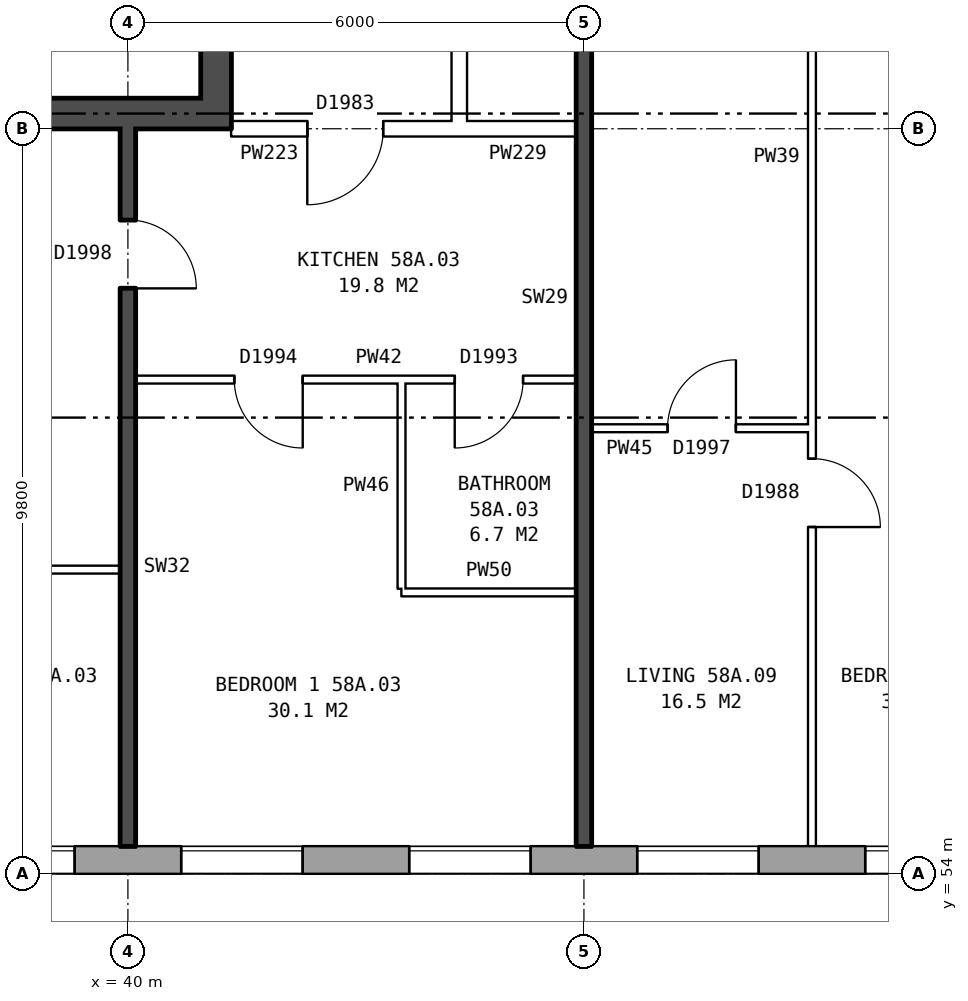
"""IFC4 building model, lengths in metres.
Left out: names, types, materials, properties, quantities, classifications, styles, units other than length and angle.
Written with IfcOpenShell. Run it as: python <this file> out.ifc"""

import sys

from ifc_helpers import new_model, si_unit, direction, frame, frame_2d, origin, place, context, subcontext, project, spatial, rectangle, extrude, element, fill, save


model = new_model("IFC4")
c1 = context("Model", 3, precision=1e-05, world=origin(), true_north=direction((0.0, 1.0)))
c2 = subcontext(c1, "Body", "Model", "MODEL_VIEW")
j1 = project(units=[si_unit("LENGTHUNIT", "METRE"), si_unit("PLANEANGLEUNIT", "RADIAN")], contexts=[c1])
p1 = place(None, origin())
s1 = spatial("IfcSite", under=j1, at=p1, CompositionType="ELEMENT")
p2 = place(p1, origin())
s2 = spatial("IfcBuilding", under=s1, at=p2, CompositionType="ELEMENT")
p3 = place(p2, frame((0.0, 0.0, 205.9)))
s3 = spatial("IfcBuildingStorey", under=s2, at=p3, CompositionType="ELEMENT", Elevation=205.9)
p4 = place(p3, frame((35.075, 54.18, 0.0), z_axis=(0.0, 0.0, 1.0), x_axis=(1.0, 0.0, 0.0)))
e1 = element("IfcWall", 1, at=p4, inside=s3, PredefinedType="STANDARD", context=c2, shape_type="SweptSolid", body=[
    extrude(rectangle(XDim=39.875, YDim=0.36, at=frame_2d((19.938, 0.0))), origin(), (0.0, 0.0, 1.0), 2.85),
])
p5 = place(p4, frame((2.625, 0.0, 0.8)))
e2 = element("IfcOpeningElement", 2, at=p5, cuts=e1, PredefinedType="OPENING", context=c2, shape_type="SweptSolid", body=[
    extrude(rectangle(XDim=1.6, YDim=1.8, at=frame_2d((0.8, 0.9))), frame((0.0, 0.19, 0.0), z_axis=(0.0, -1.0, 0.0), x_axis=(1.0, 0.0, 0.0)), (0.0, 0.0, 1.0), 0.38),
])
p6 = place(p4, frame((5.625, 0.0, 0.8)))
e3 = element("IfcOpeningElement", 3, at=p6, cuts=e1, PredefinedType="OPENING", context=c2, shape_type="SweptSolid", body=[
    extrude(rectangle(XDim=1.6, YDim=1.8, at=frame_2d((0.8, 0.9))), frame((0.0, 0.19, 0.0), z_axis=(0.0, -1.0, 0.0), x_axis=(1.0, 0.0, 0.0)), (0.0, 0.0, 1.0), 0.38),
])
p7 = place(p4, frame((8.625, 0.0, 0.8)))
e4 = element("IfcOpeningElement", 4, at=p7, cuts=e1, PredefinedType="OPENING", context=c2, shape_type="SweptSolid", body=[
    extrude(rectangle(XDim=1.6, YDim=1.8, at=frame_2d((0.8, 0.9))), frame((0.0, 0.19, 0.0), z_axis=(0.0, -1.0, 0.0), x_axis=(1.0, 0.0, 0.0)), (0.0, 0.0, 1.0), 0.38),
])
p8 = place(p4, frame((11.625, 0.0, 0.8)))
e5 = element("IfcOpeningElement", 5, at=p8, cuts=e1, PredefinedType="OPENING", context=c2, shape_type="SweptSolid", body=[
    extrude(rectangle(XDim=1.6, YDim=1.8, at=frame_2d((0.8, 0.9))), frame((0.0, 0.19, 0.0), z_axis=(0.0, -1.0, 0.0), x_axis=(1.0, 0.0, 0.0)), (0.0, 0.0, 1.0), 0.38),
])
p9 = place(p4, frame((14.625, 0.0, 0.8)))
e6 = element("IfcOpeningElement", 6, at=p9, cuts=e1, PredefinedType="OPENING", context=c2, shape_type="SweptSolid", body=[
    extrude(rectangle(XDim=1.6, YDim=1.8, at=frame_2d((0.8, 0.9))), frame((0.0, 0.19, 0.0), z_axis=(0.0, -1.0, 0.0), x_axis=(1.0, 0.0, 0.0)), (0.0, 0.0, 1.0), 0.38),
])
p10 = place(p4, frame((17.625, 0.0, 0.8)))
e7 = element("IfcOpeningElement", 7, at=p10, cuts=e1, PredefinedType="OPENING", context=c2, shape_type="SweptSolid", body=[
    extrude(rectangle(XDim=1.6, YDim=1.8, at=frame_2d((0.8, 0.9))), frame((0.0, 0.19, 0.0), z_axis=(0.0, -1.0, 0.0), x_axis=(1.0, 0.0, 0.0)), (0.0, 0.0, 1.0), 0.38),
])
p11 = place(p4, frame((20.625, 0.0, 0.8)))
e8 = element("IfcOpeningElement", 8, at=p11, cuts=e1, PredefinedType="OPENING", context=c2, shape_type="SweptSolid", body=[
    extrude(rectangle(XDim=1.6, YDim=1.8, at=frame_2d((0.8, 0.9))), frame((0.0, 0.19, 0.0), z_axis=(0.0, -1.0, 0.0), x_axis=(1.0, 0.0, 0.0)), (0.0, 0.0, 1.0), 0.38),
])
p12 = place(p4, frame((23.625, 0.0, 0.8)))
e9 = element("IfcOpeningElement", 9, at=p12, cuts=e1, PredefinedType="OPENING", context=c2, shape_type="SweptSolid", body=[
    extrude(rectangle(XDim=1.6, YDim=1.8, at=frame_2d((0.8, 0.9))), frame((0.0, 0.19, 0.0), z_axis=(0.0, -1.0, 0.0), x_axis=(1.0, 0.0, 0.0)), (0.0, 0.0, 1.0), 0.38),
])
p13 = place(p4, frame((26.625, 0.0, 0.8)))
e10 = element("IfcOpeningElement", 10, at=p13, cuts=e1, PredefinedType="OPENING", context=c2, shape_type="SweptSolid", body=[
    extrude(rectangle(XDim=1.6, YDim=1.8, at=frame_2d((0.8, 0.9))), frame((0.0, 0.19, 0.0), z_axis=(0.0, -1.0, 0.0), x_axis=(1.0, 0.0, 0.0)), (0.0, 0.0, 1.0), 0.38),
])
p14 = place(p4, frame((29.625, 0.0, 0.8)))
e11 = element("IfcOpeningElement", 11, at=p14, cuts=e1, PredefinedType="OPENING", context=c2, shape_type="SweptSolid", body=[
    extrude(rectangle(XDim=1.6, YDim=1.8, at=frame_2d((0.8, 0.9))), frame((0.0, 0.19, 0.0), z_axis=(0.0, -1.0, 0.0), x_axis=(1.0, 0.0, 0.0)), (0.0, 0.0, 1.0), 0.38),
])
p15 = place(p4, frame((32.625, 0.0, 0.8)))
e12 = element("IfcOpeningElement", 12, at=p15, cuts=e1, PredefinedType="OPENING", context=c2, shape_type="SweptSolid", body=[
    extrude(rectangle(XDim=1.6, YDim=1.8, at=frame_2d((0.8, 0.9))), frame((0.0, 0.19, 0.0), z_axis=(0.0, -1.0, 0.0), x_axis=(1.0, 0.0, 0.0)), (0.0, 0.0, 1.0), 0.38),
])
p16 = place(p4, frame((35.125, 0.0, 0.8)))
e13 = element("IfcOpeningElement", 13, at=p16, cuts=e1, PredefinedType="OPENING", context=c2, shape_type="SweptSolid", body=[
    extrude(rectangle(XDim=1.0, YDim=1.8, at=frame_2d((0.5, 0.9))), frame((0.0, 0.19, 0.0), z_axis=(0.0, -1.0, 0.0), x_axis=(1.0, 0.0, 0.0)), (0.0, 0.0, 1.0), 0.38),
])
p17 = place(p4, frame((38.475, 0.0, 0.8)))
e14 = element("IfcOpeningElement", 14, at=p17, cuts=e1, PredefinedType="OPENING", context=c2, shape_type="SweptSolid", body=[
    extrude(rectangle(XDim=1.0, YDim=1.8, at=frame_2d((0.5, 0.9))), frame((0.0, 0.19, 0.0), z_axis=(0.0, -1.0, 0.0), x_axis=(1.0, 0.0, 0.0)), (0.0, 0.0, 1.0), 0.38),
])
p18 = place(p3, frame((41.16, 76.2, 0.0), z_axis=(0.0, 0.0, 1.0), x_axis=(0.0, -1.0, 0.0)))
e15 = element("IfcWall", 15, at=p18, inside=s3, PredefinedType="SHEAR", context=c2, shape_type="SweptSolid", body=[
    extrude(rectangle(XDim=12.4, YDim=0.4, at=frame_2d((6.2, 0.0))), origin(), (0.0, 0.0, 1.0), 2.85),
])
p19 = place(p18, frame((1.325, 0.0, 0.0)))
e16 = element("IfcOpeningElement", 16, at=p19, cuts=e15, PredefinedType="OPENING", context=c2, shape_type="SweptSolid", body=[
    extrude(rectangle(XDim=1.1, YDim=2.1, at=frame_2d((0.55, 1.05))), frame((0.0, 0.21, 0.0), z_axis=(0.0, -1.0, 0.0), x_axis=(1.0, 0.0, 0.0)), (0.0, 0.0, 1.0), 0.42),
])
p20 = place(p18, frame((4.225, 0.0, 0.0)))
e17 = element("IfcOpeningElement", 17, at=p20, cuts=e15, PredefinedType="OPENING", context=c2, shape_type="SweptSolid", body=[
    extrude(rectangle(XDim=0.85, YDim=2.1, at=frame_2d((0.425, 1.05))), frame((0.0, 0.21, 0.0), z_axis=(0.0, -1.0, 0.0), x_axis=(1.0, 0.0, 0.0)), (0.0, 0.0, 1.0), 0.42),
])
p21 = place(p18, frame((7.475, 0.0, 0.0)))
e18 = element("IfcOpeningElement", 18, at=p21, cuts=e15, PredefinedType="OPENING", context=c2, shape_type="SweptSolid", body=[
    extrude(rectangle(XDim=0.85, YDim=2.1, at=frame_2d((0.425, 1.05))), frame((0.0, 0.21, 0.0), z_axis=(0.0, -1.0, 0.0), x_axis=(1.0, 0.0, 0.0)), (0.0, 0.0, 1.0), 0.42),
])
p22 = place(p18, frame((9.9, 0.0, 0.0)))
e19 = element("IfcOpeningElement", 19, at=p22, cuts=e15, PredefinedType="OPENING", context=c2, shape_type="SweptSolid", body=[
    extrude(rectangle(XDim=1.1, YDim=2.1, at=frame_2d((0.55, 1.05))), frame((0.0, 0.21, 0.0), z_axis=(0.0, -1.0, 0.0), x_axis=(1.0, 0.0, 0.0)), (0.0, 0.0, 1.0), 0.42),
])
p23 = place(p3, frame((40.96, 64.0, 0.0), z_axis=(0.0, 0.0, 1.0), x_axis=(-1.0, 0.0, 0.0)))
e20 = element("IfcWall", 20, at=p23, inside=s3, PredefinedType="SHEAR", context=c2, shape_type="SweptSolid", body=[
    extrude(rectangle(XDim=8.2, YDim=0.4, at=frame_2d((4.1, 0.0))), origin(), (0.0, 0.0, 1.0), 2.85),
])
p24 = place(p3, frame((44.36, 63.9, 0.0), z_axis=(0.0, 0.0, 1.0), x_axis=(0.0, 1.0, 0.0)))
e21 = element("IfcWall", 21, at=p24, inside=s3, PredefinedType="PARTITIONING", context=c2, shape_type="SweptSolid", body=[
    extrude(rectangle(XDim=12.2, YDim=0.2, at=frame_2d((6.1, 0.0))), origin(), (0.0, 0.0, 1.0), 2.85),
])
p25 = place(p24, frame((5.1, 0.0, 0.0)))
e22 = element("IfcOpeningElement", 22, at=p25, cuts=e21, PredefinedType="OPENING", context=c2, shape_type="SweptSolid", body=[
    extrude(rectangle(XDim=2.0, YDim=2.1, at=frame_2d((1.0, 1.05))), frame((0.0, 0.11, 0.0), z_axis=(0.0, -1.0, 0.0), x_axis=(1.0, 0.0, 0.0)), (0.0, 0.0, 1.0), 0.22),
])
p26 = place(p3, frame((43.6, 57.7, 0.0), z_axis=(0.0, 0.0, 1.0), x_axis=(1.0, 0.0, 0.0)))
e23 = element("IfcWall", 23, at=p26, inside=s3, PredefinedType="PARTITIONING", context=c2, shape_type="SweptSolid", body=[
    extrude(rectangle(XDim=2.3, YDim=0.1, at=frame_2d((1.15, 0.0))), origin(), (0.0, 0.0, 1.0), 2.85),
])
p27 = place(p3, frame((32.36, 58.0, 0.0), z_axis=(0.0, 0.0, 1.0), x_axis=(1.0, 0.0, 0.0)))
e24 = element("IfcWall", 24, at=p27, inside=s3, PredefinedType="PARTITIONING", context=c2, shape_type="SweptSolid", body=[
    extrude(rectangle(XDim=7.54, YDim=0.1, at=frame_2d((3.77, 0.0))), origin(), (0.0, 0.0, 1.0), 2.85),
])
p28 = place(p27, frame((3.32, 0.0, 0.0)))
e25 = element("IfcOpeningElement", 25, at=p28, cuts=e24, PredefinedType="OPENING", context=c2, shape_type="SweptSolid", body=[
    extrude(rectangle(XDim=0.9, YDim=2.1, at=frame_2d((0.45, 1.05))), frame((0.0, 0.06, 0.0), z_axis=(0.0, -1.0, 0.0), x_axis=(1.0, 0.0, 0.0)), (0.0, 0.0, 1.0), 0.12),
])
p29 = place(p3, frame((46.1, 59.86, 0.0), z_axis=(0.0, 0.0, 1.0), x_axis=(1.0, 0.0, 0.0)))
e26 = element("IfcWall", 26, at=p29, inside=s3, PredefinedType="PARTITIONING", context=c2, shape_type="SweptSolid", body=[
    extrude(rectangle(XDim=2.9, YDim=0.1, at=frame_2d((1.45, 0.0))), origin(), (0.0, 0.0, 1.0), 2.85),
])
p30 = place(p29, frame((1.0, 0.0, 0.0)))
e27 = element("IfcOpeningElement", 27, at=p30, cuts=e26, PredefinedType="OPENING", context=c2, shape_type="SweptSolid", body=[
    extrude(rectangle(XDim=0.9, YDim=2.1, at=frame_2d((0.45, 1.05))), frame((0.0, 0.06, 0.0), z_axis=(0.0, -1.0, 0.0), x_axis=(1.0, 0.0, 0.0)), (0.0, 0.0, 1.0), 0.12),
])
p31 = place(p3, frame((40.1, 60.5, 0.0), z_axis=(0.0, 0.0, 1.0), x_axis=(1.0, 0.0, 0.0)))
e28 = element("IfcWall", 28, at=p31, inside=s3, PredefinedType="PARTITIONING", context=c2, shape_type="SweptSolid", body=[
    extrude(rectangle(XDim=5.8, YDim=0.1, at=frame_2d((2.9, 0.0))), origin(), (0.0, 0.0, 1.0), 2.85),
])
p32 = place(p31, frame((1.3, 0.0, 0.0)))
e29 = element("IfcOpeningElement", 29, at=p32, cuts=e28, PredefinedType="OPENING", context=c2, shape_type="SweptSolid", body=[
    extrude(rectangle(XDim=0.9, YDim=2.1, at=frame_2d((0.45, 1.05))), frame((0.0, 0.06, 0.0), z_axis=(0.0, -1.0, 0.0), x_axis=(1.0, 0.0, 0.0)), (0.0, 0.0, 1.0), 0.12),
])
p33 = place(p31, frame((4.2, 0.0, 0.0)))
e30 = element("IfcOpeningElement", 30, at=p33, cuts=e28, PredefinedType="OPENING", context=c2, shape_type="SweptSolid", body=[
    extrude(rectangle(XDim=0.9, YDim=2.1, at=frame_2d((0.45, 1.05))), frame((0.0, 0.06, 0.0), z_axis=(0.0, -1.0, 0.0), x_axis=(1.0, 0.0, 0.0)), (0.0, 0.0, 1.0), 0.12),
])
p34 = place(p3, frame((41.36, 63.8, 0.0), z_axis=(0.0, 0.0, 1.0), x_axis=(1.0, 0.0, 0.0)))
e31 = element("IfcWall", 31, at=p34, inside=s3, PredefinedType="PARTITIONING", context=c2, shape_type="SweptSolid", body=[
    extrude(rectangle(XDim=3.0, YDim=0.2, at=frame_2d((1.5, 0.0))), origin(), (0.0, 0.0, 1.0), 2.85),
])
p35 = place(p34, frame((1.0, 0.0, 0.0)))
e32 = element("IfcOpeningElement", 32, at=p35, cuts=e31, PredefinedType="OPENING", context=c2, shape_type="SweptSolid", body=[
    extrude(rectangle(XDim=1.0, YDim=2.1, at=frame_2d((0.5, 1.05))), frame((0.0, 0.11, 0.0), z_axis=(0.0, -1.0, 0.0), x_axis=(1.0, 0.0, 0.0)), (0.0, 0.0, 1.0), 0.22),
])
p36 = place(p3, frame((44.36, 63.8, 0.0), z_axis=(0.0, 0.0, 1.0), x_axis=(1.0, 0.0, 0.0)))
e33 = element("IfcWall", 33, at=p36, inside=s3, PredefinedType="PARTITIONING", context=c2, shape_type="SweptSolid", body=[
    extrude(rectangle(XDim=1.54, YDim=0.2, at=frame_2d((0.77, 0.0))), origin(), (0.0, 0.0, 1.0), 2.85),
])
p37 = place(p3, frame((40.0, 54.36, 0.0), z_axis=(0.0, 0.0, 1.0), x_axis=(0.0, 1.0, 0.0)))
e34 = element("IfcWall", 34, at=p37, inside=s3, PredefinedType="SOLIDWALL", context=c2, shape_type="SweptSolid", body=[
    extrude(rectangle(XDim=9.44, YDim=0.2, at=frame_2d((4.72, 0.0))), origin(), (0.0, 0.0, 1.0), 2.85),
])
p38 = place(p37, frame((7.34, 0.0, 0.0)))
e35 = element("IfcOpeningElement", 35, at=p38, cuts=e34, PredefinedType="OPENING", context=c2, shape_type="SweptSolid", body=[
    extrude(rectangle(XDim=0.9, YDim=2.1, at=frame_2d((0.45, 1.05))), frame((0.0, 0.11, 0.0), z_axis=(0.0, -1.0, 0.0), x_axis=(1.0, 0.0, 0.0)), (0.0, 0.0, 1.0), 0.22),
])
p39 = place(p3, frame((43.6, 57.75, 0.0), z_axis=(0.0, 0.0, 1.0), x_axis=(0.0, 1.0, 0.0)))
e36 = element("IfcWall", 36, at=p39, inside=s3, PredefinedType="PARTITIONING", context=c2, shape_type="SweptSolid", body=[
    extrude(rectangle(XDim=2.7, YDim=0.1, at=frame_2d((1.35, 0.0))), origin(), (0.0, 0.0, 1.0), 2.85),
])
p40 = place(p3, frame((46.0, 54.36, 0.0), z_axis=(0.0, 0.0, 1.0), x_axis=(0.0, 1.0, 0.0)))
e37 = element("IfcWall", 37, at=p40, inside=s3, PredefinedType="SOLIDWALL", context=c2, shape_type="SweptSolid", body=[
    extrude(rectangle(XDim=14.44, YDim=0.2, at=frame_2d((7.22, 0.0))), origin(), (0.0, 0.0, 1.0), 2.85),
])
p41 = place(p3, frame((49.0, 54.36, 0.0), z_axis=(0.0, 0.0, 1.0), x_axis=(0.0, 1.0, 0.0)))
e38 = element("IfcWall", 38, at=p41, inside=s3, PredefinedType="PARTITIONING", context=c2, shape_type="SweptSolid", body=[
    extrude(rectangle(XDim=14.34, YDim=0.1, at=frame_2d((7.17, 0.0))), origin(), (0.0, 0.0, 1.0), 2.85),
])
p42 = place(p41, frame((4.2, 0.0, 0.0)))
e39 = element("IfcOpeningElement", 39, at=p42, cuts=e38, PredefinedType="OPENING", context=c2, shape_type="SweptSolid", body=[
    extrude(rectangle(XDim=0.9, YDim=2.1, at=frame_2d((0.45, 1.05))), frame((0.0, 0.06, 0.0), z_axis=(0.0, -1.0, 0.0), x_axis=(1.0, 0.0, 0.0)), (0.0, 0.0, 1.0), 0.12),
])
p43 = place(p41, frame((13.04, 0.0, 0.0)))
e40 = element("IfcOpeningElement", 40, at=p43, cuts=e38, PredefinedType="OPENING", context=c2, shape_type="SweptSolid", body=[
    extrude(rectangle(XDim=0.9, YDim=2.1, at=frame_2d((0.45, 1.05))), frame((0.0, 0.06, 0.0), z_axis=(0.0, -1.0, 0.0), x_axis=(1.0, 0.0, 0.0)), (0.0, 0.0, 1.0), 0.12),
])
p44 = place(p5, origin())
e41 = element("IfcWindow", 41, at=p44, inside=s3, PartitioningType="SINGLE_PANEL", PredefinedType="WINDOW", context=c2, shape_type="SweptSolid", body=[
    extrude(rectangle(XDim=1.6, YDim=1.8, at=frame_2d((0.8, 0.9))), frame((0.0, 0.15, 0.0), z_axis=(0.0, -1.0, 0.0), x_axis=(1.0, 0.0, 0.0)), (0.0, 0.0, 1.0), 0.06),
])
fill(e2, e41)
p45 = place(p6, origin())
e42 = element("IfcWindow", 42, at=p45, inside=s3, PartitioningType="SINGLE_PANEL", PredefinedType="WINDOW", context=c2, shape_type="SweptSolid", body=[
    extrude(rectangle(XDim=1.6, YDim=1.8, at=frame_2d((0.8, 0.9))), frame((0.0, 0.15, 0.0), z_axis=(0.0, -1.0, 0.0), x_axis=(1.0, 0.0, 0.0)), (0.0, 0.0, 1.0), 0.06),
])
fill(e3, e42)
p46 = place(p7, origin())
e43 = element("IfcWindow", 43, at=p46, inside=s3, PartitioningType="SINGLE_PANEL", PredefinedType="WINDOW", context=c2, shape_type="SweptSolid", body=[
    extrude(rectangle(XDim=1.6, YDim=1.8, at=frame_2d((0.8, 0.9))), frame((0.0, 0.15, 0.0), z_axis=(0.0, -1.0, 0.0), x_axis=(1.0, 0.0, 0.0)), (0.0, 0.0, 1.0), 0.06),
])
fill(e4, e43)
p47 = place(p8, origin())
e44 = element("IfcWindow", 44, at=p47, inside=s3, PartitioningType="SINGLE_PANEL", PredefinedType="WINDOW", context=c2, shape_type="SweptSolid", body=[
    extrude(rectangle(XDim=1.6, YDim=1.8, at=frame_2d((0.8, 0.9))), frame((0.0, 0.15, 0.0), z_axis=(0.0, -1.0, 0.0), x_axis=(1.0, 0.0, 0.0)), (0.0, 0.0, 1.0), 0.06),
])
fill(e5, e44)
p48 = place(p9, origin())
e45 = element("IfcWindow", 45, at=p48, inside=s3, PartitioningType="SINGLE_PANEL", PredefinedType="WINDOW", context=c2, shape_type="SweptSolid", body=[
    extrude(rectangle(XDim=1.6, YDim=1.8, at=frame_2d((0.8, 0.9))), frame((0.0, 0.15, 0.0), z_axis=(0.0, -1.0, 0.0), x_axis=(1.0, 0.0, 0.0)), (0.0, 0.0, 1.0), 0.06),
])
fill(e6, e45)
p49 = place(p32, frame((0.9, 0.0, 0.0), z_axis=(0.0, 0.0, 1.0), x_axis=(-1.0, 0.0, 0.0)))
e46 = element("IfcDoor", 46, at=p49, inside=s3, OperationType="SINGLE_SWING_LEFT", PredefinedType="DOOR", context=c2, shape_type="SweptSolid", body=[
    extrude(rectangle(XDim=0.9, YDim=2.1, at=frame_2d((0.45, 1.05))), frame((0.0, 0.025, 0.0), z_axis=(0.0, -1.0, 0.0), x_axis=(1.0, 0.0, 0.0)), (0.0, 0.0, 1.0), 0.05),
])
fill(e29, e46)
p50 = place(p35, frame((1.0, 0.0, 0.0), z_axis=(0.0, 0.0, 1.0), x_axis=(-1.0, 0.0, 0.0)))
e47 = element("IfcDoor", 47, at=p50, inside=s3, OperationType="SINGLE_SWING_RIGHT", PredefinedType="DOOR", context=c2, shape_type="SweptSolid", body=[
    extrude(rectangle(XDim=1.0, YDim=2.1, at=frame_2d((0.5, 1.05))), frame((0.0, 0.025, 0.0), z_axis=(0.0, -1.0, 0.0), x_axis=(1.0, 0.0, 0.0)), (0.0, 0.0, 1.0), 0.05),
])
fill(e32, e47)
p51 = place(p38, frame((0.9, 0.0, 0.0), z_axis=(0.0, 0.0, 1.0), x_axis=(-1.0, 0.0, 0.0)))
e48 = element("IfcDoor", 48, at=p51, inside=s3, OperationType="SINGLE_SWING_RIGHT", PredefinedType="DOOR", context=c2, shape_type="SweptSolid", body=[
    extrude(rectangle(XDim=0.9, YDim=2.1, at=frame_2d((0.45, 1.05))), frame((0.0, 0.025, 0.0), z_axis=(0.0, -1.0, 0.0), x_axis=(1.0, 0.0, 0.0)), (0.0, 0.0, 1.0), 0.05),
])
fill(e35, e48)
p52 = place(p33, frame((0.9, 0.0, 0.0), z_axis=(0.0, 0.0, 1.0), x_axis=(-1.0, 0.0, 0.0)))
e49 = element("IfcDoor", 49, at=p52, inside=s3, OperationType="SINGLE_SWING_RIGHT", PredefinedType="DOOR", context=c2, shape_type="SweptSolid", body=[
    extrude(rectangle(XDim=0.9, YDim=2.1, at=frame_2d((0.45, 1.05))), frame((0.0, 0.025, 0.0), z_axis=(0.0, -1.0, 0.0), x_axis=(1.0, 0.0, 0.0)), (0.0, 0.0, 1.0), 0.05),
])
fill(e30, e49)
p53 = place(p42, frame((0.9, 0.0, 0.0), z_axis=(0.0, 0.0, 1.0), x_axis=(-1.0, 0.0, 0.0)))
e50 = element("IfcDoor", 50, at=p53, inside=s3, OperationType="SINGLE_SWING_RIGHT", PredefinedType="DOOR", context=c2, shape_type="SweptSolid", body=[
    extrude(rectangle(XDim=0.9, YDim=2.1, at=frame_2d((0.45, 1.05))), frame((0.0, 0.025, 0.0), z_axis=(0.0, -1.0, 0.0), x_axis=(1.0, 0.0, 0.0)), (0.0, 0.0, 1.0), 0.05),
])
fill(e39, e50)
p54 = place(p30, origin())
e51 = element("IfcDoor", 51, at=p54, inside=s3, OperationType="SINGLE_SWING_RIGHT", PredefinedType="DOOR", context=c2, shape_type="SweptSolid", body=[
    extrude(rectangle(XDim=0.9, YDim=2.1, at=frame_2d((0.45, 1.05))), frame((0.0, 0.025, 0.0), z_axis=(0.0, -1.0, 0.0), x_axis=(1.0, 0.0, 0.0)), (0.0, 0.0, 1.0), 0.05),
])
fill(e27, e51)
save(model, sys.argv[1])
